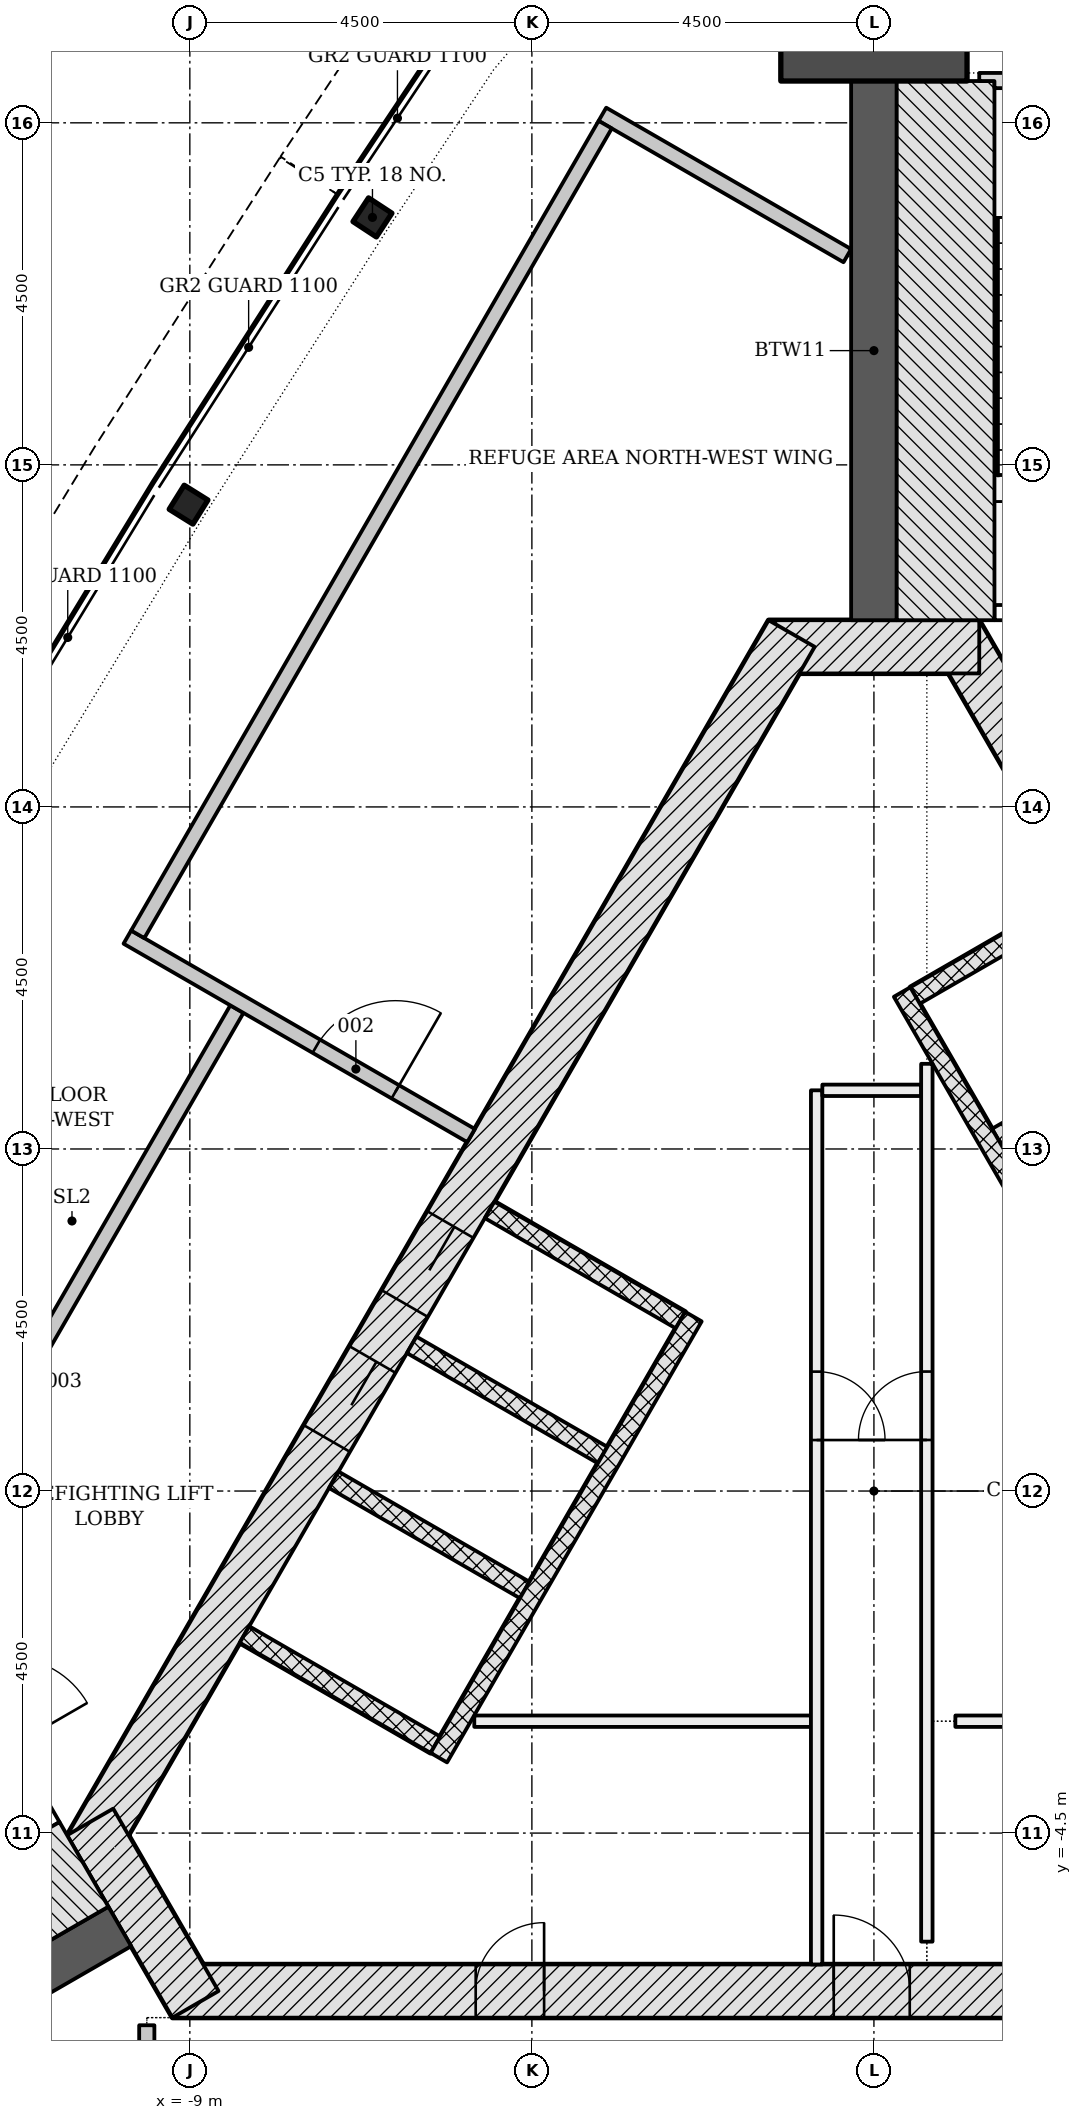
"""IFC4 building model, lengths in metres.
Left out: names, types, materials, properties, quantities, classifications, styles, units other than length and angle.
Written with IfcOpenShell. Run it as: python <this file> out.ifc"""

import sys

from ifc_helpers import new_model, si_unit, direction, frame, frame_2d, origin, origin_2d, place, context, subcontext, project, spatial, polyline, rectangle, i_section, outline, extrude, element, fill, save


model = new_model("IFC4")
c1 = context("Model", 3, precision=1e-05, world=origin(), true_north=direction((0.0, 1.0)))
c2 = subcontext(c1, "Body", "Model", "MODEL_VIEW")
j1 = project(units=[si_unit("LENGTHUNIT", "METRE"), si_unit("PLANEANGLEUNIT", "RADIAN")], contexts=[c1])
p1 = place(None, origin())
s1 = spatial("IfcSite", under=j1, at=p1, CompositionType="ELEMENT")
p2 = place(p1, origin())
s2 = spatial("IfcBuilding", under=s1, at=p2, CompositionType="ELEMENT")
p3 = place(p2, frame((0.0, 0.0, 250.8)))
s3 = spatial("IfcBuildingStorey", under=s2, at=p3, CompositionType="ELEMENT", Elevation=250.8)
p4 = place(p3, frame((-9.229, -6.578, -0.3), z_axis=(0.0, 0.0, 1.0), x_axis=(1.0, 0.0, 0.0)))
e1 = element("IfcWall", 1, at=p4, inside=s3, PredefinedType="SHEAR", context=c2, shape_type="SweptSolid", body=[
    extrude(rectangle(XDim=18.458, YDim=0.7, at=frame_2d((9.229, 0.0))), origin(), (0.0, 0.0, 1.0), 7.2),
])
p5 = place(p4, frame((8.7, 0.0, 0.3)))
e2 = element("IfcOpeningElement", 2, at=p5, cuts=e1, PredefinedType="OPENING", context=c2, shape_type="SweptSolid", body=[
    extrude(rectangle(XDim=1.0, YDim=2.1, at=frame_2d((0.5, 1.05))), frame((0.0, 0.36, 0.0), z_axis=(0.0, -1.0, 0.0), x_axis=(1.0, 0.0, 0.0)), (0.0, 0.0, 1.0), 0.72),
])
p6 = place(p4, frame((3.99, 0.0, 0.3)))
e3 = element("IfcOpeningElement", 3, at=p6, cuts=e1, PredefinedType="OPENING", context=c2, shape_type="SweptSolid", body=[
    extrude(rectangle(XDim=0.9, YDim=2.1, at=frame_2d((0.45, 1.05))), frame((0.0, 0.36, 0.0), z_axis=(0.0, -1.0, 0.0), x_axis=(1.0, 0.0, 0.0)), (0.0, 0.0, 1.0), 0.72),
])
p7 = place(p4, frame((13.539, 0.0, 0.3)))
e4 = element("IfcOpeningElement", 4, at=p7, cuts=e1, PredefinedType="OPENING", context=c2, shape_type="SweptSolid", body=[
    extrude(rectangle(XDim=0.9, YDim=2.1, at=frame_2d((0.45, 1.05))), frame((0.0, 0.36, 0.0), z_axis=(0.0, -1.0, 0.0), x_axis=(1.0, 0.0, 0.0)), (0.0, 0.0, 1.0), 0.72),
])
p8 = place(p3, frame((10.311, -4.703, -0.3), z_axis=(0.0, 0.0, 1.0), x_axis=(-0.500001446645, 0.866024568562, 0.0)))
e5 = element("IfcWall", 5, at=p8, inside=s3, PredefinedType="SHEAR", context=c2, shape_type="SweptSolid", body=[
    extrude(rectangle(XDim=18.458, YDim=0.7, at=frame_2d((9.229, 0.0))), origin(), (0.0, 0.0, 1.0), 7.2),
])
p9 = place(p3, frame((1.386, 11.106, -0.3), z_axis=(0.0, 0.0, 1.0), x_axis=(-1.0, 0.0, 0.0)))
e6 = element("IfcWall", 6, at=p9, inside=s3, PredefinedType="SHEAR", context=c2, shape_type="SweptSolid", body=[
    extrude(rectangle(XDim=2.771, YDim=0.7, at=frame_2d((1.386, 0.0))), origin(), (0.0, 0.0, 1.0), 7.2),
])
p10 = place(p3, frame((-1.083, 11.281, -0.3), z_axis=(0.0, 0.0, 1.0), x_axis=(-0.500001446645, -0.866024568562, 0.0)))
e7 = element("IfcWall", 7, at=p10, inside=s3, PredefinedType="SHEAR", context=c2, shape_type="SweptSolid", body=[
    extrude(rectangle(XDim=18.458, YDim=0.7, at=frame_2d((9.229, 0.0))), origin(), (0.0, 0.0, 1.0), 7.2),
])
p11 = place(p10, frame((8.979, 0.0, 0.3)))
e8 = element("IfcOpeningElement", 8, at=p11, cuts=e7, PredefinedType="OPENING", context=c2, shape_type="SweptSolid", body=[
    extrude(rectangle(XDim=1.2, YDim=2.1, at=frame_2d((0.6, 1.05))), frame((0.0, 0.36, 0.0), z_axis=(0.0, -1.0, 0.0), x_axis=(1.0, 0.0, 0.0)), (0.0, 0.0, 1.0), 0.72),
])
p12 = place(p10, frame((11.029, 0.0, 0.3)))
e9 = element("IfcOpeningElement", 9, at=p12, cuts=e7, PredefinedType="OPENING", context=c2, shape_type="SweptSolid", body=[
    extrude(rectangle(XDim=1.2, YDim=2.1, at=frame_2d((0.6, 1.05))), frame((0.0, 0.36, 0.0), z_axis=(0.0, -1.0, 0.0), x_axis=(1.0, 0.0, 0.0)), (0.0, 0.0, 1.0), 0.72),
])
p13 = place(p3, frame((-10.311, -4.353, -0.3), z_axis=(0.0, 0.0, 1.0), x_axis=(0.500042739161, -0.866000726912, 0.0)))
e10 = element("IfcWall", 10, at=p13, inside=s3, PredefinedType="SHEAR", context=c2, shape_type="SweptSolid", body=[
    extrude(rectangle(XDim=2.771, YDim=0.7, at=frame_2d((1.386, 0.0))), origin(), (0.0, 0.0, 1.0), 7.2),
])
p14 = place(p3, frame((0.0, 11.456, -0.3), z_axis=(0.0, 0.0, 1.0), x_axis=(0.0, 1.0, 0.0)))
e11 = element("IfcWall", 11, at=p14, inside=s3, PredefinedType="SHEAR", context=c2, shape_type="SweptSolid", body=[
    extrude(rectangle(XDim=7.094, YDim=0.6, at=frame_2d((3.547, 0.0))), origin(), (0.0, 0.0, 1.0), 7.2),
])
p15 = place(p3, frame((-9.922, -5.728, -0.3), z_axis=(0.0, 0.0, 1.0), x_axis=(-0.866029688112, -0.499992579254, 0.0)))
e12 = element("IfcWall", 12, at=p15, inside=s3, PredefinedType="SHEAR", context=c2, shape_type="SweptSolid", body=[
    extrude(rectangle(XDim=7.093, YDim=0.6, at=frame_2d((3.547, 0.0))), origin(), (0.0, 0.0, 1.0), 7.2),
])
p16 = place(p3, frame((0.0, 19.775, -0.3), z_axis=(0.0, 0.0, 1.0), x_axis=(0.0, 1.0, 0.0)))
e13 = element("IfcColumn", 13, at=p16, inside=s3, PredefinedType="COLUMN", context=c2, shape_type="SweptSolid", body=[
    extrude(rectangle(XDim=2.45, YDim=2.45, at=origin_2d()), origin(), (0.0, 0.0, 1.0), 7.2),
])
for number, where, z_axis, x_axis in (
    (14, (-6.597, 16.756, -0.3), (0.0, 0.0, 1.0), (-0.549, -0.836, 0.0)),
    (15, (-9.017, 12.977, -0.3), (0.0, 0.0, 1.0), (-0.529, -0.848, 0.0)),
):
    element("IfcColumn", number, at=place(p3, frame(where, z_axis=z_axis, x_axis=x_axis)), inside=s3, PredefinedType="COLUMN", context=c2, shape_type="SweptSolid", body=[
        extrude(i_section(OverallWidth=0.373, OverallDepth=0.368, WebThickness=0.015, FlangeThickness=0.024, FilletRadius=0.015, at=origin_2d()), origin(), (0.0, 0.0, 1.0), 7.2),
    ])
for number, where, z_axis, x_axis in (
    (16, (3.781, 5.907, -0.3), (0.0, 0.0, 1.0), (-0.866, -0.5, 0.0)),
    (17, (2.706, 7.769, -0.3), (0.0, 0.0, 1.0), (-0.866, -0.5, 0.0)),
):
    element("IfcWall", number, at=place(p3, frame(where, z_axis=z_axis, x_axis=x_axis)), inside=s3, PredefinedType="PARTITIONING", context=c2, shape_type="SweptSolid", body=[
        extrude(rectangle(XDim=2.5, YDim=0.25, at=frame_2d((1.25, 0.0))), origin(), (0.0, 0.0, 1.0), 7.2),
    ])
p17 = place(p3, frame((5.87, -2.961, 0.0), z_axis=(0.0, 0.0, 1.0), x_axis=(-0.50000615651, 0.866021849293, 0.0)))
e18 = element("IfcWall", 18, at=p17, inside=s3, PredefinedType="PARTITIONING", context=c2, shape_type="SweptSolid", body=[
    extrude(rectangle(XDim=11.0, YDim=0.25, at=frame_2d((5.5, 0.0))), origin(), (0.0, 0.0, 1.0), 6.9),
])
for number, where, z_axis, x_axis in (
    (19, (-5.056, 3.699, -0.3), (0.0, 0.0, 1.0), (0.866, -0.5, 0.0)),
    (20, (-6.081, 1.923, -0.3), (0.0, 0.0, 1.0), (0.866, -0.5, 0.0)),
    (21, (-7.106, 0.148, -0.3), (0.0, 0.0, 1.0), (0.866, -0.5, 0.0)),
    (22, (-8.281, -1.887, -0.3), (0.0, 0.0, 1.0), (0.866, -0.5, 0.0)),
):
    element("IfcWall", number, at=place(p3, frame(where, z_axis=z_axis, x_axis=x_axis)), inside=s3, PredefinedType="PARTITIONING", context=c2, shape_type="SweptSolid", body=[
        extrude(rectangle(XDim=2.9, YDim=0.25, at=frame_2d((1.45, 0.0))), origin(), (0.0, 0.0, 1.0), 7.2),
    ])
p18 = place(p3, frame((-2.374, 2.294, 0.0), z_axis=(0.0, 0.0, 1.0), x_axis=(-0.500003174267, -0.866023571113, 0.0)))
e23 = element("IfcWall", 23, at=p18, inside=s3, PredefinedType="PARTITIONING", context=c2, shape_type="SweptSolid", body=[
    extrude(rectangle(XDim=6.7, YDim=0.25, at=frame_2d((3.35, 0.0))), origin(), (0.0, 0.0, 1.0), 6.9),
])
p19 = place(p3, frame((-5.258, -3.028, 0.0), z_axis=(0.0, 0.0, 1.0), x_axis=(1.0, 0.0, 0.0)))
e24 = element("IfcWall", 24, at=p19, inside=s3, PredefinedType="PARTITIONING", context=c2, shape_type="SweptSolid", body=[
    extrude(rectangle(XDim=4.429, YDim=0.15, at=frame_2d((2.215, 0.0))), origin(), (0.0, 0.0, 1.0), 6.9),
])
p20 = place(p3, frame((-0.754, 5.272, 0.0), z_axis=(0.0, 0.0, 1.0), x_axis=(0.0, -1.0, 0.0)))
e25 = element("IfcWall", 25, at=p20, inside=s3, PredefinedType="PARTITIONING", context=c2, shape_type="SweptSolid", body=[
    extrude(rectangle(XDim=11.5, YDim=0.15, at=frame_2d((5.75, 0.0))), origin(), (0.0, 0.0, 1.0), 6.9),
])
p21 = place(p20, frame((3.701, 0.0, 0.0)))
e26 = element("IfcOpeningElement", 26, at=p21, cuts=e25, PredefinedType="OPENING", context=c2, shape_type="SweptSolid", body=[
    extrude(rectangle(XDim=0.9, YDim=2.1, at=frame_2d((0.45, 1.05))), frame((0.0, 0.085, 0.0), z_axis=(0.0, -1.0, 0.0), x_axis=(1.0, 0.0, 0.0)), (0.0, 0.0, 1.0), 0.17),
])
p22 = place(p3, frame((-0.679, 5.272, 0.0), z_axis=(0.0, 0.0, 1.0), x_axis=(1.0, 0.0, 0.0)))
e27 = element("IfcWall", 27, at=p22, inside=s3, PredefinedType="PARTITIONING", context=c2, shape_type="SweptSolid", body=[
    extrude(rectangle(XDim=1.3, YDim=0.15, at=frame_2d((0.65, 0.0))), origin(), (0.0, 0.0, 1.0), 6.9),
])
p23 = place(p3, frame((0.696, -5.928, 0.0), z_axis=(0.0, 0.0, 1.0), x_axis=(0.0, 1.0, 0.0)))
e28 = element("IfcWall", 28, at=p23, inside=s3, PredefinedType="PARTITIONING", context=c2, shape_type="SweptSolid", body=[
    extrude(rectangle(XDim=11.549, YDim=0.15, at=frame_2d((5.774, 0.0))), origin(), (0.0, 0.0, 1.0), 6.9),
])
p24 = place(p23, frame((6.6, 0.0, 0.0)))
e29 = element("IfcOpeningElement", 29, at=p24, cuts=e28, PredefinedType="OPENING", context=c2, shape_type="SweptSolid", body=[
    extrude(rectangle(XDim=0.9, YDim=2.1, at=frame_2d((0.45, 1.05))), frame((0.0, 0.085, 0.0), z_axis=(0.0, -1.0, 0.0), x_axis=(1.0, 0.0, 0.0)), (0.0, 0.0, 1.0), 0.17),
])
p25 = place(p3, frame((1.071, -3.028, 0.0), z_axis=(0.0, 0.0, 1.0), x_axis=(1.0, 0.0, 0.0)))
e30 = element("IfcWall", 30, at=p25, inside=s3, PredefinedType="PARTITIONING", context=c2, shape_type="SweptSolid", body=[
    extrude(rectangle(XDim=7.569, YDim=0.15, at=frame_2d((3.784, 0.0))), origin(), (0.0, 0.0, 1.0), 6.9),
])
p26 = place(p3, frame((5.135, 11.556, -0.3), z_axis=(0.0, 0.0, 1.0), x_axis=(-1.0, 0.0, 0.0)))
e31 = element("IfcWall", 31, at=p26, inside=s3, PredefinedType="SHEAR", context=c2, shape_type="SweptSolid", body=[
    extrude(rectangle(XDim=3.55, YDim=0.2, at=frame_2d((1.775, 0.0))), origin(), (0.0, 0.0, 1.0), 7.2),
])
p27 = place(p26, frame((1.175, 0.0, 0.3)))
e32 = element("IfcOpeningElement", 32, at=p27, cuts=e31, PredefinedType="OPENING", context=c2, shape_type="SweptSolid", body=[
    extrude(rectangle(XDim=1.2, YDim=2.1, at=frame_2d((0.6, 1.05))), frame((0.0, 0.11, 0.0), z_axis=(0.0, -1.0, 0.0), x_axis=(1.0, 0.0, 0.0)), (0.0, 0.0, 1.0), 0.22),
])
p28 = place(p3, frame((0.943, 11.456, -0.3), z_axis=(0.0, 0.0, 1.0), x_axis=(0.0, 1.0, 0.0)))
e33 = element("IfcWall", 33, at=p28, inside=s3, PredefinedType="SHEAR", context=c2, shape_type="SweptSolid", body=[
    extrude(rectangle(XDim=7.094, YDim=1.286, at=frame_2d((3.547, 0.0))), origin(), (0.0, 0.0, 1.0), 7.2),
])
p29 = place(p3, frame((0.0, 0.0, -0.3)))
e34 = element("IfcWall", 34, at=p29, inside=s3, PredefinedType="SHEAR", context=c2, shape_type="SweptSolid", body=[
    extrude(outline(polyline([(5.336, 17.056), (3.736, 18.656), (1.385, 18.656), (1.385, 18.55), (1.586, 18.55), (1.586, 18.55), (1.586, 18.55), (1.586, 18.55), (1.586, 18.55), (1.586, 18.55), (1.586, 18.55), (1.586, 18.55), (1.586, 18.55), (1.586, 18.55), (1.586, 18.55), (1.586, 18.55), (1.586, 18.55), (1.586, 18.55), (1.586, 18.55), (1.586, 18.55), (1.586, 18.55), (1.586, 18.456), (3.653, 18.456), (5.135, 16.974), (5.135, 17.056), (5.135, 17.056), (5.135, 17.056), (5.135, 17.056), (5.135, 17.056), (5.135, 17.056), (5.135, 17.056), (5.135, 17.056), (5.135, 17.056), (5.135, 17.056), (5.135, 17.056), (5.135, 17.056), (5.135, 17.056), (5.135, 17.056), (5.135, 17.056), (5.135, 17.056), (5.135, 17.056), (5.336, 17.056)])), origin(), (0.0, 0.0, 1.0), 7.2),
])
p30 = place(p3, frame((-12.576, -1.331, -0.3), z_axis=(0.0, 0.0, 1.0), x_axis=(0.499970499736, -0.8660424351, 0.0)))
e35 = element("IfcWall", 35, at=p30, inside=s3, PredefinedType="SHEAR", context=c2, shape_type="SweptSolid", body=[
    extrude(rectangle(XDim=3.55, YDim=0.2, at=frame_2d((1.775, 0.0))), origin(), (0.0, 0.0, 1.0), 7.2),
])
p31 = place(p30, frame((1.175, 0.0, 0.3)))
e36 = element("IfcOpeningElement", 36, at=p31, cuts=e35, PredefinedType="OPENING", context=c2, shape_type="SweptSolid", body=[
    extrude(rectangle(XDim=1.2, YDim=2.1, at=frame_2d((0.6, 1.05))), frame((0.0, 0.11, 0.0), z_axis=(0.0, -1.0, 0.0), x_axis=(1.0, 0.0, 0.0)), (0.0, 0.0, 1.0), 0.22),
])
p32 = place(p3, frame((-10.393, -4.912, -0.3), z_axis=(0.0, 0.0, 1.0), x_axis=(-0.866023389271, -0.500003489223, 0.0)))
e37 = element("IfcWall", 37, at=p32, inside=s3, PredefinedType="SHEAR", context=c2, shape_type="SweptSolid", body=[
    extrude(rectangle(XDim=7.094, YDim=1.286, at=frame_2d((3.547, 0.0))), origin(), (0.0, 0.0, 1.0), 7.2),
])
p33 = place(p3, frame((-12.658, -1.068, 0.0), z_axis=(0.0, 0.0, 1.0), x_axis=(0.500000816281, 0.866024932504, 0.0)))
e38 = element("IfcWall", 38, at=p33, inside=s3, PredefinedType="PARTITIONING", context=c2, shape_type="SweptSolid", body=[
    extrude(rectangle(XDim=8.554, YDim=0.2, at=frame_2d((4.277, 0.0))), origin(), (0.0, 0.0, 1.0), 6.352),
])
p34 = place(p33, frame((2.292, 0.0, 0.0)))
e39 = element("IfcOpeningElement", 39, at=p34, cuts=e38, PredefinedType="OPENING", context=c2, shape_type="SweptSolid", body=[
    extrude(rectangle(XDim=1.2, YDim=2.1, at=frame_2d((0.6, 1.05))), frame((0.0, 0.11, 0.0), z_axis=(0.0, -1.0, 0.0), x_axis=(1.0, 0.0, 0.0)), (0.0, 0.0, 1.0), 0.22),
])
p35 = place(p3, frame((-9.822, 7.287, 0.0), z_axis=(0.0, 0.0, 1.0), x_axis=(0.866030647982, -0.499990916673, 0.0)))
e40 = element("IfcWall", 40, at=p35, inside=s3, PredefinedType="PARTITIONING", context=c2, shape_type="SweptSolid", body=[
    extrude(rectangle(XDim=5.222, YDim=0.2, at=frame_2d((2.611, 0.0))), origin(), (0.0, 0.0, 1.0), 6.9),
])
p36 = place(p35, frame((2.872, 0.0, 0.0)))
e41 = element("IfcOpeningElement", 41, at=p36, cuts=e40, PredefinedType="OPENING", context=c2, shape_type="SweptSolid", body=[
    extrude(rectangle(XDim=1.2, YDim=2.1, at=frame_2d((0.6, 1.05))), frame((0.0, 0.11, 0.0), z_axis=(0.0, -1.0, 0.0), x_axis=(1.0, 0.0, 0.0)), (0.0, 0.0, 1.0), 0.22),
])
p37 = place(p3, frame((-0.35, 16.252, 0.0), z_axis=(0.0, 0.0, 1.0), x_axis=(-0.866021677438, 0.500006454166, 0.0)))
e42 = element("IfcWall", 42, at=p37, inside=s3, PredefinedType="PARTITIONING", context=c2, shape_type="SweptSolid", body=[
    extrude(rectangle(XDim=3.721, YDim=0.2, at=frame_2d((1.86, 0.0))), origin(), (0.0, 0.0, 1.0), 6.9),
])
p38 = place(p3, frame((-3.536, 17.976, 0.0), z_axis=(0.0, 0.0, 1.0), x_axis=(-0.499994497941, -0.866028580376, 0.0)))
e43 = element("IfcWall", 43, at=p38, inside=s3, PredefinedType="PARTITIONING", context=c2, shape_type="SweptSolid", body=[
    extrude(rectangle(XDim=12.3, YDim=0.2, at=frame_2d((6.15, 0.0))), origin(), (0.0, 0.0, 1.0), 6.9),
])
p39 = place(p3, frame((-9.566, -11.45, 0.0), z_axis=(0.0, 0.0, 1.0), x_axis=(0.0, 1.0, 0.0)))
e44 = element("IfcWall", 44, at=p39, inside=s3, PredefinedType="PARTITIONING", context=c2, shape_type="SweptSolid", body=[
    extrude(rectangle(XDim=4.422, YDim=0.2, at=frame_2d((2.211, 0.0))), origin(), (0.0, 0.0, 1.0), 6.9),
])
p40 = place(p11, origin())
e45 = element("IfcDoor", 45, at=p40, inside=s3, OperationType="DOUBLE_DOOR_SLIDING", PredefinedType="DOOR", context=c2, shape_type="SweptSolid", body=[
    extrude(rectangle(XDim=1.2, YDim=2.1, at=frame_2d((0.6, 1.05))), frame((0.0, 0.025, 0.0), z_axis=(0.0, -1.0, 0.0), x_axis=(1.0, 0.0, 0.0)), (0.0, 0.0, 1.0), 0.05),
])
fill(e8, e45)
p41 = place(p12, origin())
e46 = element("IfcDoor", 46, at=p41, inside=s3, OperationType="DOUBLE_DOOR_SLIDING", PredefinedType="DOOR", context=c2, shape_type="SweptSolid", body=[
    extrude(rectangle(XDim=1.2, YDim=2.1, at=frame_2d((0.6, 1.05))), frame((0.0, 0.025, 0.0), z_axis=(0.0, -1.0, 0.0), x_axis=(1.0, 0.0, 0.0)), (0.0, 0.0, 1.0), 0.05),
])
fill(e9, e46)
p42 = place(p5, origin())
e47 = element("IfcDoor", 47, at=p42, inside=s3, OperationType="SINGLE_SWING_LEFT", PredefinedType="DOOR", context=c2, shape_type="SweptSolid", body=[
    extrude(rectangle(XDim=1.0, YDim=2.1, at=frame_2d((0.5, 1.05))), frame((0.0, 0.075, 0.0), z_axis=(0.0, -1.0, 0.0), x_axis=(1.0, 0.0, 0.0)), (0.0, 0.0, 1.0), 0.15),
])
fill(e2, e47)
p43 = place(p6, origin())
e48 = element("IfcDoor", 48, at=p43, inside=s3, OperationType="SINGLE_SWING_RIGHT", PredefinedType="DOOR", context=c2, shape_type="SweptSolid", body=[
    extrude(rectangle(XDim=0.9, YDim=2.1, at=frame_2d((0.45, 1.05))), frame((0.0, 0.075, 0.0), z_axis=(0.0, -1.0, 0.0), x_axis=(1.0, 0.0, 0.0)), (0.0, 0.0, 1.0), 0.15),
])
fill(e3, e48)
p44 = place(p21, origin())
e49 = element("IfcDoor", 49, at=p44, inside=s3, OperationType="SINGLE_SWING_RIGHT", PredefinedType="DOOR", context=c2, shape_type="SweptSolid", body=[
    extrude(rectangle(XDim=0.9, YDim=2.1, at=frame_2d((0.45, 1.05))), frame((0.0, 0.025, 0.0), z_axis=(0.0, -1.0, 0.0), x_axis=(1.0, 0.0, 0.0)), (0.0, 0.0, 1.0), 0.05),
])
fill(e26, e49)
p45 = place(p24, origin())
e50 = element("IfcDoor", 50, at=p45, inside=s3, OperationType="SINGLE_SWING_LEFT", PredefinedType="DOOR", context=c2, shape_type="SweptSolid", body=[
    extrude(rectangle(XDim=0.9, YDim=2.1, at=frame_2d((0.45, 1.05))), frame((0.0, 0.025, 0.0), z_axis=(0.0, -1.0, 0.0), x_axis=(1.0, 0.0, 0.0)), (0.0, 0.0, 1.0), 0.05),
])
fill(e29, e50)
p46 = place(p36, origin())
e51 = element("IfcDoor", 51, at=p46, inside=s3, OperationType="SINGLE_SWING_RIGHT", PredefinedType="DOOR", context=c2, shape_type="SweptSolid", body=[
    extrude(rectangle(XDim=1.2, YDim=2.1, at=frame_2d((0.6, 1.05))), frame((0.0, 0.025, 0.0), z_axis=(0.0, -1.0, 0.0), x_axis=(1.0, 0.0, 0.0)), (0.0, 0.0, 1.0), 0.05),
])
fill(e41, e51)
save(model, sys.argv[1])
